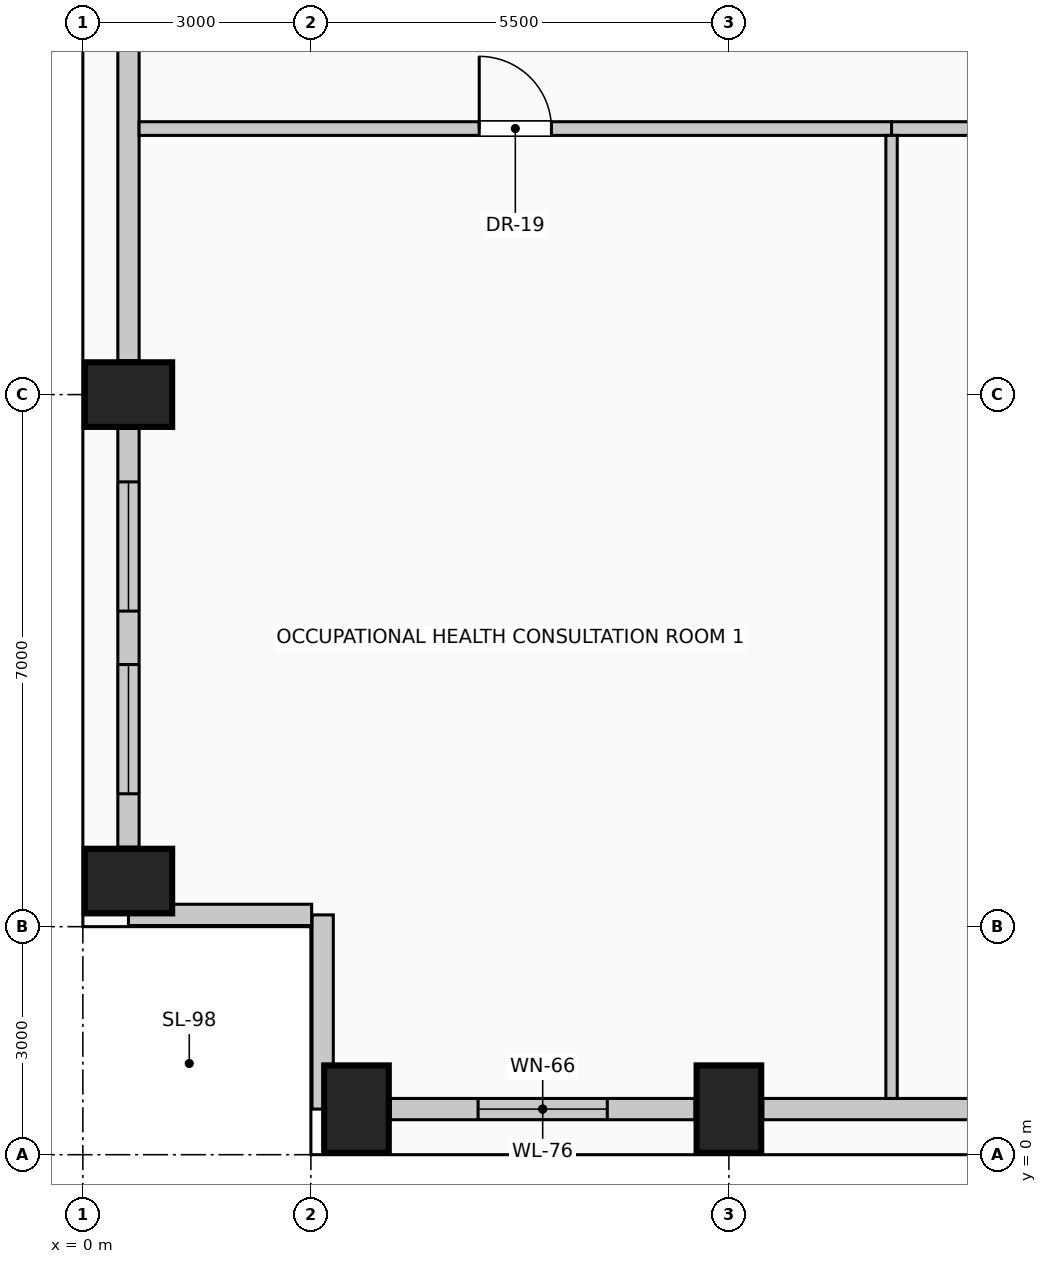
"""IFC4 building model, lengths in metres.
Left out: names, types, materials, properties, quantities, classifications, styles, units other than length and angle.
Written with IfcOpenShell. Run it as: python <this file> out.ifc"""

import sys

from ifc_helpers import new_model, si_unit, direction, frame, frame_2d, origin, origin_2d, place, context, subcontext, project, spatial, rectangle, extrude, element, fill, save


model = new_model("IFC4")
c1 = context("Model", 3, precision=1e-05, world=origin(), true_north=direction((0.0, 1.0)))
c2 = subcontext(c1, "Body", "Model", "MODEL_VIEW")
j1 = project(units=[si_unit("LENGTHUNIT", "METRE"), si_unit("PLANEANGLEUNIT", "RADIAN")], contexts=[c1])
p1 = place(None, origin())
s1 = spatial("IfcSite", under=j1, at=p1, CompositionType="ELEMENT")
p2 = place(p1, origin())
s2 = spatial("IfcBuilding", under=s1, at=p2, CompositionType="ELEMENT")
p3 = place(p2, frame((0.0, 0.0, 120.6)))
s3 = spatial("IfcBuildingStorey", under=s2, at=p3, CompositionType="ELEMENT", Elevation=120.6)
for number, where, z_axis, x_axis in (
    (1, (3.6, 0.6, 0.0), (0.0, 0.0, 1.0), (1.0, 0.0, 0.0)),
    (2, (8.5, 0.6, 0.0), (0.0, 0.0, 1.0), (1.0, 0.0, 0.0)),
    (3, (0.6, 3.6, 0.0), (0.0, 0.0, 1.0), (0.0, 1.0, 0.0)),
    (4, (0.6, 10.0, 0.0), (0.0, 0.0, 1.0), (0.0, 1.0, 0.0)),
):
    element("IfcColumn", number, at=place(p3, frame(where, z_axis=z_axis, x_axis=x_axis)), inside=s3, PredefinedType="COLUMN", context=c2, shape_type="SweptSolid", body=[
        extrude(rectangle(XDim=0.85, YDim=1.15, at=origin_2d()), origin(), (0.0, 0.0, 1.0), 4.0),
    ])
p4 = place(p3, frame((8.055, 0.6, 0.0), z_axis=(0.0, 0.0, 1.0), x_axis=(-1.0, 0.0, 0.0)))
e5 = element("IfcWall", 5, at=p4, inside=s3, PredefinedType="SOLIDWALL", context=c2, shape_type="SweptSolid", body=[
    extrude(rectangle(XDim=4.01, YDim=0.28, at=frame_2d((2.005, 0.0))), origin(), (0.0, 0.0, 1.0), 2.875),
])
p5 = place(p4, frame((1.155, 0.0, 0.5)))
e6 = element("IfcOpeningElement", 6, at=p5, cuts=e5, PredefinedType="OPENING", context=c2, shape_type="SweptSolid", body=[
    extrude(rectangle(XDim=1.7, YDim=1.95, at=frame_2d((0.85, 0.975))), frame((0.0, 0.15, 0.0), z_axis=(0.0, -1.0, 0.0), x_axis=(1.0, 0.0, 0.0)), (0.0, 0.0, 1.0), 0.3),
])
p6 = place(p3, frame((13.555, 0.6, 0.0), z_axis=(0.0, 0.0, 1.0), x_axis=(-1.0, 0.0, 0.0)))
e7 = element("IfcWall", 7, at=p6, inside=s3, PredefinedType="SOLIDWALL", context=c2, shape_type="SweptSolid", body=[
    extrude(rectangle(XDim=4.61, YDim=0.28, at=frame_2d((2.305, 0.0))), origin(), (0.0, 0.0, 1.0), 2.875),
])
p7 = place(p3, frame((0.6, 4.045, 0.0), z_axis=(0.0, 0.0, 1.0), x_axis=(0.0, 1.0, 0.0)))
e8 = element("IfcWall", 8, at=p7, inside=s3, PredefinedType="SOLIDWALL", context=c2, shape_type="SweptSolid", body=[
    extrude(rectangle(XDim=5.51, YDim=0.28, at=frame_2d((2.755, 0.0))), origin(), (0.0, 0.0, 1.0), 2.875),
])
p8 = place(p7, frame((0.703, 0.0, 0.5)))
e9 = element("IfcOpeningElement", 9, at=p8, cuts=e8, PredefinedType="OPENING", context=c2, shape_type="SweptSolid", body=[
    extrude(rectangle(XDim=1.7, YDim=1.95, at=frame_2d((0.85, 0.975))), frame((0.0, 0.15, 0.0), z_axis=(0.0, -1.0, 0.0), x_axis=(1.0, 0.0, 0.0)), (0.0, 0.0, 1.0), 0.3),
])
p9 = place(p7, frame((3.107, 0.0, 0.5)))
e10 = element("IfcOpeningElement", 10, at=p9, cuts=e8, PredefinedType="OPENING", context=c2, shape_type="SweptSolid", body=[
    extrude(rectangle(XDim=1.7, YDim=1.95, at=frame_2d((0.85, 0.975))), frame((0.0, 0.15, 0.0), z_axis=(0.0, -1.0, 0.0), x_axis=(1.0, 0.0, 0.0)), (0.0, 0.0, 1.0), 0.3),
])
p10 = place(p3, frame((0.6, 10.445, 0.0), z_axis=(0.0, 0.0, 1.0), x_axis=(0.0, 1.0, 0.0)))
e11 = element("IfcWall", 11, at=p10, inside=s3, PredefinedType="SOLIDWALL", context=c2, shape_type="SweptSolid", body=[
    extrude(rectangle(XDim=7.11, YDim=0.28, at=frame_2d((3.555, 0.0))), origin(), (0.0, 0.0, 1.0), 2.875),
])
p11 = place(p3, frame((3.155, 0.6, 0.0), z_axis=(0.0, 0.0, 1.0), x_axis=(0.0, 1.0, 0.0)))
e12 = element("IfcWall", 12, at=p11, inside=s3, PredefinedType="SOLIDWALL", context=c2, shape_type="SweptSolid", body=[
    extrude(rectangle(XDim=2.555, YDim=0.28, at=frame_2d((1.277, 0.0))), origin(), (0.0, 0.0, 1.0), 3.725),
])
p12 = place(p3, frame((3.01, 3.155, 0.0), z_axis=(0.0, 0.0, 1.0), x_axis=(-1.0, 0.0, 0.0)))
e13 = element("IfcWall", 13, at=p12, inside=s3, PredefinedType="SOLIDWALL", context=c2, shape_type="SweptSolid", body=[
    extrude(rectangle(XDim=2.41, YDim=0.28, at=frame_2d((1.205, 0.0))), origin(), (0.0, 0.0, 1.0), 3.725),
])
p13 = place(p3, frame((0.74, 13.5, 0.0), z_axis=(0.0, 0.0, 1.0), x_axis=(1.0, 0.0, 0.0)))
e14 = element("IfcWall", 14, at=p13, inside=s3, PredefinedType="PARTITIONING", context=c2, shape_type="SweptSolid", body=[
    extrude(rectangle(XDim=9.9, YDim=0.18, at=frame_2d((4.95, 0.0))), origin(), (0.0, 0.0, 1.0), 3.725),
])
p14 = place(p13, frame((4.475, 0.0, 0.0)))
e15 = element("IfcOpeningElement", 15, at=p14, cuts=e14, PredefinedType="OPENING", context=c2, shape_type="SweptSolid", body=[
    extrude(rectangle(XDim=0.95, YDim=2.15, at=frame_2d((0.475, 1.075))), frame((0.0, 0.1, 0.0), z_axis=(0.0, -1.0, 0.0), x_axis=(1.0, 0.0, 0.0)), (0.0, 0.0, 1.0), 0.2),
])
p15 = place(p3, frame((10.64, 13.5, 0.0), z_axis=(0.0, 0.0, 1.0), x_axis=(1.0, 0.0, 0.0)))
e16 = element("IfcWall", 16, at=p15, inside=s3, PredefinedType="PARTITIONING", context=c2, shape_type="SweptSolid", body=[
    extrude(rectangle(XDim=4.72, YDim=0.18, at=frame_2d((2.36, 0.0))), origin(), (0.0, 0.0, 1.0), 3.725),
])
p16 = place(p15, frame((1.835, 0.0, 0.0)))
e17 = element("IfcOpeningElement", 17, at=p16, cuts=e16, PredefinedType="OPENING", context=c2, shape_type="SweptSolid", body=[
    extrude(rectangle(XDim=1.05, YDim=2.15, at=frame_2d((0.525, 1.075))), frame((0.0, 0.1, 0.0), z_axis=(0.0, -1.0, 0.0), x_axis=(1.0, 0.0, 0.0)), (0.0, 0.0, 1.0), 0.2),
])
p17 = place(p3, frame((10.64, 0.74, 0.0), z_axis=(0.0, 0.0, 1.0), x_axis=(0.0, 1.0, 0.0)))
e18 = element("IfcWall", 18, at=p17, inside=s3, PredefinedType="PARTITIONING", context=c2, shape_type="SweptSolid", body=[
    extrude(rectangle(XDim=12.67, YDim=0.15, at=frame_2d((6.335, 0.0))), origin(), (0.0, 0.0, 1.0), 3.725),
])
p18 = place(p5, origin())
e19 = element("IfcWindow", 19, at=p18, inside=s3, PartitioningType="SINGLE_PANEL", PredefinedType="WINDOW", context=c2, shape_type="SweptSolid", body=[
    extrude(rectangle(XDim=1.7, YDim=1.95, at=frame_2d((0.85, 0.975))), frame((0.0, 0.03, 0.0), z_axis=(0.0, -1.0, 0.0), x_axis=(1.0, 0.0, 0.0)), (0.0, 0.0, 1.0), 0.06),
])
fill(e6, e19)
p19 = place(p8, origin())
e20 = element("IfcWindow", 20, at=p19, inside=s3, PartitioningType="SINGLE_PANEL", PredefinedType="WINDOW", context=c2, shape_type="SweptSolid", body=[
    extrude(rectangle(XDim=1.7, YDim=1.95, at=frame_2d((0.85, 0.975))), frame((0.0, 0.03, 0.0), z_axis=(0.0, -1.0, 0.0), x_axis=(1.0, 0.0, 0.0)), (0.0, 0.0, 1.0), 0.06),
])
fill(e9, e20)
p20 = place(p9, origin())
e21 = element("IfcWindow", 21, at=p20, inside=s3, PartitioningType="SINGLE_PANEL", PredefinedType="WINDOW", context=c2, shape_type="SweptSolid", body=[
    extrude(rectangle(XDim=1.7, YDim=1.95, at=frame_2d((0.85, 0.975))), frame((0.0, 0.03, 0.0), z_axis=(0.0, -1.0, 0.0), x_axis=(1.0, 0.0, 0.0)), (0.0, 0.0, 1.0), 0.06),
])
fill(e10, e21)
p21 = place(p14, origin())
e22 = element("IfcDoor", 22, at=p21, inside=s3, OperationType="SINGLE_SWING_LEFT", PredefinedType="DOOR", context=c2, shape_type="SweptSolid", body=[
    extrude(rectangle(XDim=0.95, YDim=2.15, at=frame_2d((0.475, 1.075))), frame((0.0, 0.025, 0.0), z_axis=(0.0, -1.0, 0.0), x_axis=(1.0, 0.0, 0.0)), (0.0, 0.0, 1.0), 0.05),
])
fill(e15, e22)
save(model, sys.argv[1])
